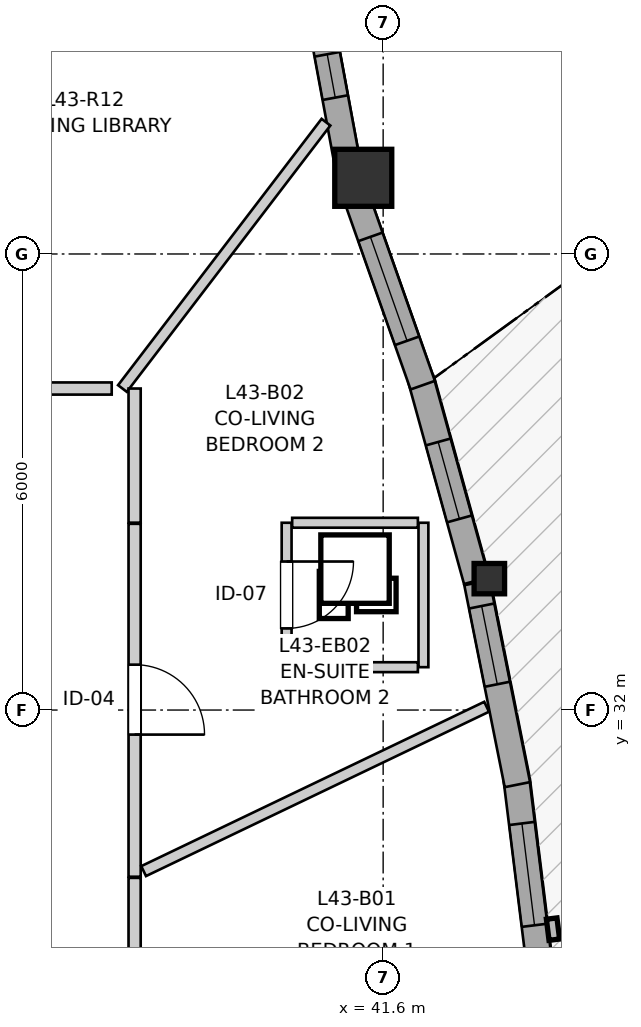
"""IFC4 building model, lengths in metres.
Left out: names, types, materials, properties, quantities, classifications, styles, units other than length and angle.
Written with IfcOpenShell. Run it as: python <this file> out.ifc"""

import sys

from ifc_helpers import new_model, si_unit, direction, frame, frame_2d, origin, origin_2d, place, context, subcontext, project, spatial, rectangle, i_section, extrude, source, transform, mapped, element, fill, save


model = new_model("IFC4")
c1 = context("Model", 3, precision=1e-05, world=origin(), true_north=direction((0.0, 1.0)))
c2 = subcontext(c1, "Body", "Model", "MODEL_VIEW")
j1 = project(units=[si_unit("LENGTHUNIT", "METRE"), si_unit("PLANEANGLEUNIT", "RADIAN")], contexts=[c1])
p1 = place(None, origin())
s1 = spatial("IfcSite", under=j1, at=p1, CompositionType="ELEMENT")
p2 = place(p1, origin())
s2 = spatial("IfcBuilding", under=s1, at=p2, CompositionType="ELEMENT")
p3 = place(p2, frame((0.0, 0.0, 145.8)))
s3 = spatial("IfcBuildingStorey", under=s2, at=p3, CompositionType="ELEMENT", Elevation=145.8)
m1 = source(origin(), c2, "Body", "SweptSolid", [
    extrude(i_section(OverallWidth=0.401, OverallDepth=0.399, WebThickness=0.023, FlangeThickness=0.036, FilletRadius=0.015, at=origin_2d()), origin(), (0.0, 0.0, 1.0), 2.95),
])
p4 = place(p3, frame((42.997, 33.729, 0.0), z_axis=(0.0, 0.0, 1.0), x_axis=(1.0, 0.0, 0.0)))
e1 = element("IfcColumn", 1, at=p4, inside=s3, PredefinedType="PILASTER", context=c2, shape_type="MappedRepresentation", body=[
    mapped(m1, transform((0.0, 0.0, 0.0), x_axis=(1.0, 0.0, 0.0), y_axis=(0.0, 1.0, 0.0), z_axis=(0.0, 0.0, 1.0), scale=1.0)),
])
m2 = source(origin(), c2, "Body", "SweptSolid", [
    extrude(rectangle(XDim=0.75, YDim=0.75, at=origin_2d()), origin(), (0.0, 0.0, 1.0), 2.95),
])
p5 = place(p3, frame((41.338, 39.002, 0.0), z_axis=(0.0, 0.0, 1.0), x_axis=(1.0, 0.0, 0.0)))
e2 = element("IfcColumn", 2, at=p5, inside=s3, PredefinedType="COLUMN", context=c2, shape_type="MappedRepresentation", body=[
    mapped(m2, transform((0.0, 0.0, 0.0), x_axis=(1.0, 0.0, 0.0), y_axis=(0.0, 1.0, 0.0), z_axis=(0.0, 0.0, 1.0), scale=1.0)),
])
p6 = place(p3, frame((43.664, 28.58, 0.0), z_axis=(0.0, 0.0, 1.0), x_axis=(-0.122794881762, 0.992432071737, 0.0)))
e3 = element("IfcWall", 3, at=p6, inside=s3, PredefinedType="SOLIDWALL", context=c2, shape_type="SweptSolid", body=[
    extrude(rectangle(XDim=2.545, YDim=0.34, at=frame_2d((1.272, 0.0))), origin(), (0.0, 0.0, 1.0), 2.53),
])
p7 = place(p6, frame((0.592, 0.0, 0.82)))
e4 = element("IfcOpeningElement", 4, at=p7, cuts=e3, PredefinedType="OPENING", context=c2, shape_type="SweptSolid", body=[
    extrude(rectangle(XDim=1.35, YDim=1.45, at=frame_2d((0.675, 0.725))), frame((0.0, 0.18, 0.0), z_axis=(0.0, -1.0, 0.0), x_axis=(1.0, 0.0, 0.0)), (0.0, 0.0, 1.0), 0.36),
])
p8 = place(p3, frame((43.366, 31.018, 0.0), z_axis=(0.0, 0.0, 1.0), x_axis=(-0.196116135138, 0.980580675691, 0.0)))
e5 = element("IfcWall", 5, at=p8, inside=s3, PredefinedType="SOLIDWALL", context=c2, shape_type="SweptSolid", body=[
    extrude(rectangle(XDim=2.71, YDim=0.34, at=frame_2d((1.355, 0.0))), origin(), (0.0, 0.0, 1.0), 2.53),
])
p9 = place(p8, frame((1.347, 0.0, 0.82)))
e6 = element("IfcOpeningElement", 6, at=p9, cuts=e5, PredefinedType="OPENING", context=c2, shape_type="SweptSolid", body=[
    extrude(rectangle(XDim=1.05, YDim=1.45, at=frame_2d((0.525, 0.725))), frame((0.0, 0.18, 0.0), z_axis=(0.0, -1.0, 0.0), x_axis=(1.0, 0.0, 0.0)), (0.0, 0.0, 1.0), 0.36),
])
p10 = place(p3, frame((42.828, 33.703, 0.0), z_axis=(0.0, 0.0, 1.0), x_axis=(-0.266340796898, 0.963878923884, 0.0)))
e7 = element("IfcWall", 7, at=p10, inside=s3, PredefinedType="SOLIDWALL", context=c2, shape_type="SweptSolid", body=[
    extrude(rectangle(XDim=2.755, YDim=0.34, at=frame_2d((1.377, 0.0))), origin(), (0.0, 0.0, 1.0), 2.53),
])
p11 = place(p10, frame((0.842, 0.0, 0.82)))
e8 = element("IfcOpeningElement", 8, at=p11, cuts=e7, PredefinedType="OPENING", context=c2, shape_type="SweptSolid", body=[
    extrude(rectangle(XDim=1.05, YDim=1.45, at=frame_2d((0.525, 0.725))), frame((0.0, 0.18, 0.0), z_axis=(0.0, -1.0, 0.0), x_axis=(1.0, 0.0, 0.0)), (0.0, 0.0, 1.0), 0.36),
])
p12 = place(p3, frame((42.121, 36.274, 0.0), z_axis=(0.0, 0.0, 1.0), x_axis=(-0.332724751299, 0.943023986902, 0.0)))
e9 = element("IfcWall", 9, at=p12, inside=s3, PredefinedType="SOLIDWALL", context=c2, shape_type="SweptSolid", body=[
    extrude(rectangle(XDim=2.678, YDim=0.34, at=frame_2d((1.339, 0.0))), origin(), (0.0, 0.0, 1.0), 2.53),
])
p13 = place(p12, frame((0.619, 0.0, 0.82)))
e10 = element("IfcOpeningElement", 10, at=p13, cuts=e9, PredefinedType="OPENING", context=c2, shape_type="SweptSolid", body=[
    extrude(rectangle(XDim=1.45, YDim=1.25, at=frame_2d((0.725, 0.625))), frame((0.0, 0.18, 0.0), z_axis=(0.0, -1.0, 0.0), x_axis=(1.0, 0.0, 0.0)), (0.0, 0.0, 1.0), 0.36),
])
p14 = place(p3, frame((41.143, 39.124, 0.0), z_axis=(0.0, 0.0, 1.0), x_axis=(-0.182320770307, 0.983239104549, 0.0)))
e11 = element("IfcWall", 11, at=p14, inside=s3, PredefinedType="SOLIDWALL", context=c2, shape_type="SweptSolid", body=[
    extrude(rectangle(XDim=1.888, YDim=0.34, at=frame_2d((0.944, 0.0))), origin(), (0.0, 0.0, 1.0), 2.53),
])
p15 = place(p14, frame((0.949, 0.0, 0.82)))
e12 = element("IfcOpeningElement", 12, at=p15, cuts=e11, PredefinedType="OPENING", context=c2, shape_type="SweptSolid", body=[
    extrude(rectangle(XDim=0.58, YDim=1.35, at=frame_2d((0.29, 0.675))), frame((0.0, 0.18, 0.0), z_axis=(0.0, -1.0, 0.0), x_axis=(1.0, 0.0, 0.0)), (0.0, 0.0, 1.0), 0.36),
])
p16 = place(p3, frame((38.33, 34.45, 0.0), z_axis=(0.0, 0.0, 1.0), x_axis=(0.0, -1.0, 0.0)))
e13 = element("IfcWall", 13, at=p16, inside=s3, PredefinedType="PARTITIONING", context=c2, shape_type="SweptSolid", body=[
    extrude(rectangle(XDim=4.643, YDim=0.16, at=frame_2d((2.322, 0.0))), origin(), (0.0, 0.0, 1.0), 2.588),
])
p17 = place(p16, frame((1.853, 0.0, 0.0)))
e14 = element("IfcOpeningElement", 14, at=p17, cuts=e13, PredefinedType="OPENING", context=c2, shape_type="SweptSolid", body=[
    extrude(rectangle(XDim=0.92, YDim=2.1, at=frame_2d((0.46, 1.05))), frame((0.0, 0.09, 0.0), z_axis=(0.0, -1.0, 0.0), x_axis=(1.0, 0.0, 0.0)), (0.0, 0.0, 1.0), 0.18),
])
p18 = place(p3, frame((38.33, 29.792, 0.0), z_axis=(0.0, 0.0, 1.0), x_axis=(0.0, -1.0, 0.0)))
e15 = element("IfcWall", 15, at=p18, inside=s3, PredefinedType="PARTITIONING", context=c2, shape_type="SweptSolid", body=[
    extrude(rectangle(XDim=4.564, YDim=0.16, at=frame_2d((2.282, 0.0))), origin(), (0.0, 0.0, 1.0), 2.95),
])
p19 = place(p18, frame((1.798, 0.0, 0.0)))
e16 = element("IfcOpeningElement", 16, at=p19, cuts=e15, PredefinedType="OPENING", context=c2, shape_type="SweptSolid", body=[
    extrude(rectangle(XDim=0.92, YDim=2.1, at=frame_2d((0.46, 1.05))), frame((0.0, 0.09, 0.0), z_axis=(0.0, -1.0, 0.0), x_axis=(1.0, 0.0, 0.0)), (0.0, 0.0, 1.0), 0.18),
])
p20 = place(p3, frame((40.33, 34.464, 0.0), z_axis=(0.0, 0.0, 1.0), x_axis=(0.0, -1.0, 0.0)))
e17 = element("IfcWall", 17, at=p20, inside=s3, PredefinedType="PARTITIONING", context=c2, shape_type="SweptSolid", body=[
    extrude(rectangle(XDim=1.9, YDim=0.13, at=frame_2d((0.95, 0.0))), origin(), (0.0, 0.0, 1.0), 2.558),
])
p21 = place(p20, frame((0.51, 0.0, 0.0)))
e18 = element("IfcOpeningElement", 18, at=p21, cuts=e17, PredefinedType="OPENING", context=c2, shape_type="SweptSolid", body=[
    extrude(rectangle(XDim=0.88, YDim=2.05, at=frame_2d((0.44, 1.025))), frame((0.0, 0.075, 0.0), z_axis=(0.0, -1.0, 0.0), x_axis=(1.0, 0.0, 0.0)), (0.0, 0.0, 1.0), 0.15),
])
p22 = place(p3, frame((38.448, 29.881, 0.0), z_axis=(0.0, 0.0, 1.0), x_axis=(0.901842564972, 0.432064796072, 0.0)))
e19 = element("IfcWall", 19, at=p22, inside=s3, PredefinedType="PARTITIONING", context=c2, shape_type="SweptSolid", body=[
    extrude(rectangle(XDim=5.004, YDim=0.145, at=frame_2d((2.502, 0.0))), origin(), (0.0, 0.0, 1.0), 2.95),
])
p23 = place(p3, frame((38.17, 36.23, 0.0), z_axis=(0.0, 0.0, 1.0), x_axis=(0.607203490548, 0.794546361811, 0.0)))
e20 = element("IfcWall", 20, at=p23, inside=s3, PredefinedType="PARTITIONING", context=c2, shape_type="SweptSolid", body=[
    extrude(rectangle(XDim=4.41, YDim=0.145, at=frame_2d((2.205, 0.0))), origin(), (0.0, 0.0, 1.0), 2.95),
])
p24 = place(p3, frame((42.13, 32.564, 0.0), z_axis=(0.0, 0.0, 1.0), x_axis=(0.0, 1.0, 0.0)))
e21 = element("IfcWall", 21, at=p24, inside=s3, PredefinedType="PARTITIONING", context=c2, shape_type="SweptSolid", body=[
    extrude(rectangle(XDim=1.9, YDim=0.13, at=frame_2d((0.95, 0.0))), origin(), (0.0, 0.0, 1.0), 2.95),
])
for number, where, z_axis, x_axis in (
    (22, (40.403, 34.464, 0.0), (0.0, 0.0, 1.0), (1.0, 0.0, 0.0)),
    (23, (40.403, 32.564, 0.0), (0.0, 0.0, 1.0), (1.0, 0.0, 0.0)),
):
    element("IfcWall", number, at=place(p3, frame(where, z_axis=z_axis, x_axis=x_axis)), inside=s3, PredefinedType="PARTITIONING", context=c2, shape_type="SweptSolid", body=[
        extrude(rectangle(XDim=1.654, YDim=0.13, at=frame_2d((0.827, 0.0))), origin(), (0.0, 0.0, 1.0), 2.95),
    ])
p25 = place(p3, frame((38.33, 34.465, 0.0), z_axis=(0.0, 0.0, 1.0), x_axis=(0.0, 1.0, 0.0)))
e24 = element("IfcWall", 24, at=p25, inside=s3, PredefinedType="PARTITIONING", context=c2, shape_type="SweptSolid", body=[
    extrude(rectangle(XDim=1.765, YDim=0.16, at=frame_2d((0.882, 0.0))), origin(), (0.0, 0.0, 1.0), 2.588),
])
p26 = place(p3, frame((36.565, 36.23, 0.0), z_axis=(0.0, 0.0, 1.0), x_axis=(1.0, 0.0, 0.0)))
e25 = element("IfcWall", 25, at=p26, inside=s3, PredefinedType="PARTITIONING", context=c2, shape_type="SweptSolid", body=[
    extrude(rectangle(XDim=1.464, YDim=0.16, at=frame_2d((0.732, 0.0))), origin(), (0.0, 0.0, 1.0), 2.95),
])
m3 = source(origin(), c2, "Body", "SweptSolid", [
    extrude(rectangle(XDim=1.35, YDim=1.45, at=frame_2d((0.675, 0.725))), frame((0.0, 0.03, 0.0), z_axis=(0.0, -1.0, 0.0), x_axis=(1.0, 0.0, 0.0)), (0.0, 0.0, 1.0), 0.06),
])
p27 = place(p7, origin())
e26 = element("IfcWindow", 26, at=p27, inside=s3, PartitioningType="SINGLE_PANEL", PredefinedType="WINDOW", context=c2, shape_type="MappedRepresentation", body=[
    mapped(m3, transform((0.0, 0.0, 0.0), x_axis=(1.0, 0.0, 0.0), y_axis=(0.0, 1.0, 0.0), z_axis=(0.0, 0.0, 1.0), scale=1.0)),
])
fill(e4, e26)
m4 = source(origin(), c2, "Body", "SweptSolid", [
    extrude(rectangle(XDim=1.05, YDim=1.45, at=frame_2d((0.525, 0.725))), frame((0.0, 0.03, 0.0), z_axis=(0.0, -1.0, 0.0), x_axis=(1.0, 0.0, 0.0)), (0.0, 0.0, 1.0), 0.06),
])
p28 = place(p9, origin())
e27 = element("IfcWindow", 27, at=p28, inside=s3, PartitioningType="SINGLE_PANEL", PredefinedType="WINDOW", context=c2, shape_type="MappedRepresentation", body=[
    mapped(m4, transform((0.0, 0.0, 0.0), x_axis=(1.0, 0.0, 0.0), y_axis=(0.0, 1.0, 0.0), z_axis=(0.0, 0.0, 1.0), scale=1.0)),
])
fill(e6, e27)
p29 = place(p11, origin())
e28 = element("IfcWindow", 28, at=p29, inside=s3, PartitioningType="SINGLE_PANEL", PredefinedType="WINDOW", context=c2, shape_type="MappedRepresentation", body=[
    mapped(m4, transform((0.0, 0.0, 0.0), x_axis=(1.0, 0.0, 0.0), y_axis=(0.0, 1.0, 0.0), z_axis=(0.0, 0.0, 1.0), scale=1.0)),
])
fill(e8, e28)
m5 = source(origin(), c2, "Body", "SweptSolid", [
    extrude(rectangle(XDim=1.45, YDim=1.25, at=frame_2d((0.725, 0.625))), frame((0.0, 0.03, 0.0), z_axis=(0.0, -1.0, 0.0), x_axis=(1.0, 0.0, 0.0)), (0.0, 0.0, 1.0), 0.06),
])
p30 = place(p13, origin())
e29 = element("IfcWindow", 29, at=p30, inside=s3, PartitioningType="SINGLE_PANEL", PredefinedType="WINDOW", context=c2, shape_type="MappedRepresentation", body=[
    mapped(m5, transform((0.0, 0.0, 0.0), x_axis=(1.0, 0.0, 0.0), y_axis=(0.0, 1.0, 0.0), z_axis=(0.0, 0.0, 1.0), scale=1.0)),
])
fill(e10, e29)
m6 = source(origin(), c2, "Body", "SweptSolid", [
    extrude(rectangle(XDim=0.58, YDim=1.35, at=frame_2d((0.29, 0.675))), frame((0.0, 0.03, 0.0), z_axis=(0.0, -1.0, 0.0), x_axis=(1.0, 0.0, 0.0)), (0.0, 0.0, 1.0), 0.06),
])
p31 = place(p15, origin())
e30 = element("IfcWindow", 30, at=p31, inside=s3, PartitioningType="SINGLE_PANEL", PredefinedType="WINDOW", context=c2, shape_type="MappedRepresentation", body=[
    mapped(m6, transform((0.0, 0.0, 0.0), x_axis=(1.0, 0.0, 0.0), y_axis=(0.0, 1.0, 0.0), z_axis=(0.0, 0.0, 1.0), scale=1.0)),
])
fill(e12, e30)
m7 = source(origin(), c2, "Body", "SweptSolid", [
    extrude(rectangle(XDim=0.92, YDim=2.1, at=frame_2d((0.46, 1.05))), frame((0.0, 0.025, 0.0), z_axis=(0.0, -1.0, 0.0), x_axis=(1.0, 0.0, 0.0)), (0.0, 0.0, 1.0), 0.05),
])
p32 = place(p17, origin())
e31 = element("IfcDoor", 31, at=p32, inside=s3, OperationType="SINGLE_SWING_RIGHT", PredefinedType="DOOR", context=c2, shape_type="MappedRepresentation", body=[
    mapped(m7, transform((0.0, 0.0, 0.0), x_axis=(1.0, 0.0, 0.0), y_axis=(0.0, 1.0, 0.0), z_axis=(0.0, 0.0, 1.0), scale=1.0)),
])
fill(e14, e31)
m8 = source(origin(), c2, "Body", "SweptSolid", [
    extrude(rectangle(XDim=0.88, YDim=2.05, at=frame_2d((0.44, 1.025))), frame((0.0, 0.025, 0.0), z_axis=(0.0, -1.0, 0.0), x_axis=(1.0, 0.0, 0.0)), (0.0, 0.0, 1.0), 0.05),
])
p33 = place(p21, origin())
e32 = element("IfcDoor", 32, at=p33, inside=s3, OperationType="SINGLE_SWING_LEFT", PredefinedType="DOOR", context=c2, shape_type="MappedRepresentation", body=[
    mapped(m8, transform((0.0, 0.0, 0.0), x_axis=(1.0, 0.0, 0.0), y_axis=(0.0, 1.0, 0.0), z_axis=(0.0, 0.0, 1.0), scale=1.0)),
])
fill(e18, e32)
save(model, sys.argv[1])
